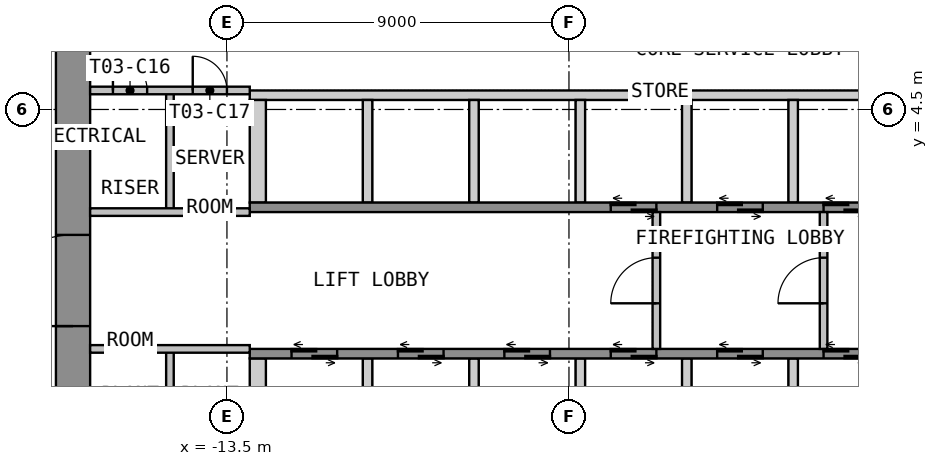
"""IFC4 building model, lengths in metres.
Left out: names, types, materials, properties, quantities, classifications, styles, units other than length and angle.
Written with IfcOpenShell. Run it as: python <this file> out.ifc"""

import sys

from ifc_helpers import new_model, si_unit, direction, frame, frame_2d, origin, place, context, subcontext, project, spatial, polyline, rectangle, outline, extrude, element, fill, save


model = new_model("IFC4")
c1 = context("Model", 3, precision=1e-05, world=origin(), true_north=direction((0.0, 1.0)))
c2 = subcontext(c1, "Body", "Model", "MODEL_VIEW")
j1 = project(units=[si_unit("LENGTHUNIT", "METRE"), si_unit("PLANEANGLEUNIT", "RADIAN")], contexts=[c1])
p1 = place(None, origin())
s1 = spatial("IfcSite", under=j1, at=p1, CompositionType="ELEMENT")
p2 = place(p1, origin())
s2 = spatial("IfcBuilding", under=s1, at=p2, CompositionType="ELEMENT")
p3 = place(p2, frame((0.0, 0.0, 53.4)))
s3 = spatial("IfcBuildingStorey", under=s2, at=p3, CompositionType="ELEMENT", Elevation=53.4)
p4 = place(p3, frame((-17.55, -12.6, 0.0), z_axis=(0.0, 0.0, 1.0), x_axis=(0.0, 1.0, 0.0)))
e1 = element("IfcWall", 1, at=p4, inside=s3, PredefinedType="SHEAR", context=c2, shape_type="SweptSolid", body=[
    extrude(rectangle(XDim=25.2, YDim=0.9, at=frame_2d((12.6, 0.0))), origin(), (0.0, 0.0, 1.0), 3.525),
])
p5 = place(p4, frame((11.4, 0.0, 0.0)))
e2 = element("IfcOpeningElement", 2, at=p5, cuts=e1, PredefinedType="OPENING", context=c2, shape_type="SweptSolid", body=[
    extrude(rectangle(XDim=2.4, YDim=2.1, at=frame_2d((1.2, 1.05))), frame((0.0, 0.46, 0.0), z_axis=(0.0, -1.0, 0.0), x_axis=(1.0, 0.0, 0.0)), (0.0, 0.0, 1.0), 0.92),
])
p6 = place(p3, origin())
e3 = element("IfcWall", 3, at=p6, inside=s3, PredefinedType="SHEAR", context=c2, shape_type="SweptSolid", body=[
    extrude(outline(polyline([(-12.9, 4.75), (12.9, 4.75), (12.9, 5.0), (-12.9, 5.0), (-12.9, 4.75)])), origin(), (0.0, 0.0, 1.0), 3.525),
])
p7 = place(p3, origin())
e4 = element("IfcWall", 4, at=p7, inside=s3, PredefinedType="SHEAR", context=c2, shape_type="SweptSolid", body=[
    extrude(outline(polyline([(-12.9, 2.05), (-12.475, 2.05), (-12.475, 4.75), (-12.9, 4.75), (-12.9, 2.05)])), origin(), (0.0, 0.0, 1.0), 3.525),
])
p8 = place(p3, origin())
e5 = element("IfcWall", 5, at=p8, inside=s3, PredefinedType="SHEAR", context=c2, shape_type="SweptSolid", body=[
    extrude(outline(polyline([(-9.925, 2.05), (-9.675, 2.05), (-9.675, 4.75), (-9.925, 4.75), (-9.925, 2.05)])), origin(), (0.0, 0.0, 1.0), 3.525),
])
p9 = place(p3, origin())
e6 = element("IfcWall", 6, at=p9, inside=s3, PredefinedType="SHEAR", context=c2, shape_type="SweptSolid", body=[
    extrude(outline(polyline([(-7.125, 2.05), (-6.875, 2.05), (-6.875, 4.75), (-7.125, 4.75), (-7.125, 2.05)])), origin(), (0.0, 0.0, 1.0), 3.525),
])
p10 = place(p3, origin())
e7 = element("IfcWall", 7, at=p10, inside=s3, PredefinedType="SHEAR", context=c2, shape_type="SweptSolid", body=[
    extrude(outline(polyline([(-4.325, 2.05), (-4.075, 2.05), (-4.075, 4.75), (-4.325, 4.75), (-4.325, 2.05)])), origin(), (0.0, 0.0, 1.0), 3.525),
])
p11 = place(p3, origin())
e8 = element("IfcWall", 8, at=p11, inside=s3, PredefinedType="SHEAR", context=c2, shape_type="SweptSolid", body=[
    extrude(outline(polyline([(-1.525, 2.05), (-1.275, 2.05), (-1.275, 4.75), (-1.525, 4.75), (-1.525, 2.05)])), origin(), (0.0, 0.0, 1.0), 3.525),
])
p12 = place(p3, origin())
e9 = element("IfcWall", 9, at=p12, inside=s3, PredefinedType="SHEAR", context=c2, shape_type="SweptSolid", body=[
    extrude(outline(polyline([(1.275, 2.05), (1.525, 2.05), (1.525, 4.75), (1.275, 4.75), (1.275, 2.05)])), origin(), (0.0, 0.0, 1.0), 3.525),
])
p13 = place(p3, frame((-12.9, 1.925, 0.0), z_axis=(0.0, 0.0, 1.0), x_axis=(1.0, 0.0, 0.0)))
e10 = element("IfcWall", 10, at=p13, inside=s3, PredefinedType="SHEAR", context=c2, shape_type="SweptSolid", body=[
    extrude(rectangle(XDim=25.8, YDim=0.25, at=frame_2d((12.9, 0.0))), origin(), (0.0, 0.0, 1.0), 3.525),
])
p14 = place(p13, frame((9.5, 0.0, 0.0)))
e11 = element("IfcOpeningElement", 11, at=p14, cuts=e10, PredefinedType="OPENING", context=c2, shape_type="SweptSolid", body=[
    extrude(rectangle(XDim=1.2, YDim=2.1, at=frame_2d((0.6, 1.05))), frame((0.0, 0.135, 0.0), z_axis=(0.0, -1.0, 0.0), x_axis=(1.0, 0.0, 0.0)), (0.0, 0.0, 1.0), 0.27),
])
p15 = place(p13, frame((12.3, 0.0, 0.0)))
e12 = element("IfcOpeningElement", 12, at=p15, cuts=e10, PredefinedType="OPENING", context=c2, shape_type="SweptSolid", body=[
    extrude(rectangle(XDim=1.2, YDim=2.1, at=frame_2d((0.6, 1.05))), frame((0.0, 0.135, 0.0), z_axis=(0.0, -1.0, 0.0), x_axis=(1.0, 0.0, 0.0)), (0.0, 0.0, 1.0), 0.27),
])
p16 = place(p13, frame((15.1, 0.0, 0.0)))
e13 = element("IfcOpeningElement", 13, at=p16, cuts=e10, PredefinedType="OPENING", context=c2, shape_type="SweptSolid", body=[
    extrude(rectangle(XDim=1.2, YDim=2.1, at=frame_2d((0.6, 1.05))), frame((0.0, 0.135, 0.0), z_axis=(0.0, -1.0, 0.0), x_axis=(1.0, 0.0, 0.0)), (0.0, 0.0, 1.0), 0.27),
])
p17 = place(p13, frame((17.9, 0.0, 0.0)))
e14 = element("IfcOpeningElement", 14, at=p17, cuts=e10, PredefinedType="OPENING", context=c2, shape_type="SweptSolid", body=[
    extrude(rectangle(XDim=1.2, YDim=2.1, at=frame_2d((0.6, 1.05))), frame((0.0, 0.135, 0.0), z_axis=(0.0, -1.0, 0.0), x_axis=(1.0, 0.0, 0.0)), (0.0, 0.0, 1.0), 0.27),
])
p18 = place(p13, frame((20.7, 0.0, 0.0)))
e15 = element("IfcOpeningElement", 15, at=p18, cuts=e10, PredefinedType="OPENING", context=c2, shape_type="SweptSolid", body=[
    extrude(rectangle(XDim=1.2, YDim=2.1, at=frame_2d((0.6, 1.05))), frame((0.0, 0.135, 0.0), z_axis=(0.0, -1.0, 0.0), x_axis=(1.0, 0.0, 0.0)), (0.0, 0.0, 1.0), 0.27),
])
p19 = place(p13, frame((23.5, 0.0, 0.0)))
e16 = element("IfcOpeningElement", 16, at=p19, cuts=e10, PredefinedType="OPENING", context=c2, shape_type="SweptSolid", body=[
    extrude(rectangle(XDim=1.2, YDim=2.1, at=frame_2d((0.6, 1.05))), frame((0.0, 0.135, 0.0), z_axis=(0.0, -1.0, 0.0), x_axis=(1.0, 0.0, 0.0)), (0.0, 0.0, 1.0), 0.27),
])
p20 = place(p3, origin())
e17 = element("IfcWall", 17, at=p20, inside=s3, PredefinedType="SHEAR", context=c2, shape_type="SweptSolid", body=[
    extrude(outline(polyline([(-12.9, -4.75), (-12.475, -4.75), (-12.475, -2.05), (-12.9, -2.05), (-12.9, -4.75)])), origin(), (0.0, 0.0, 1.0), 3.525),
])
p21 = place(p3, origin())
e18 = element("IfcWall", 18, at=p21, inside=s3, PredefinedType="SHEAR", context=c2, shape_type="SweptSolid", body=[
    extrude(outline(polyline([(-9.925, -4.75), (-9.675, -4.75), (-9.675, -2.05), (-9.925, -2.05), (-9.925, -4.75)])), origin(), (0.0, 0.0, 1.0), 3.525),
])
p22 = place(p3, origin())
e19 = element("IfcWall", 19, at=p22, inside=s3, PredefinedType="SHEAR", context=c2, shape_type="SweptSolid", body=[
    extrude(outline(polyline([(-7.125, -4.75), (-6.875, -4.75), (-6.875, -2.05), (-7.125, -2.05), (-7.125, -4.75)])), origin(), (0.0, 0.0, 1.0), 3.525),
])
p23 = place(p3, origin())
e20 = element("IfcWall", 20, at=p23, inside=s3, PredefinedType="SHEAR", context=c2, shape_type="SweptSolid", body=[
    extrude(outline(polyline([(-4.325, -4.75), (-4.075, -4.75), (-4.075, -2.05), (-4.325, -2.05), (-4.325, -4.75)])), origin(), (0.0, 0.0, 1.0), 3.525),
])
p24 = place(p3, origin())
e21 = element("IfcWall", 21, at=p24, inside=s3, PredefinedType="SHEAR", context=c2, shape_type="SweptSolid", body=[
    extrude(outline(polyline([(-1.525, -4.75), (-1.275, -4.75), (-1.275, -2.05), (-1.525, -2.05), (-1.525, -4.75)])), origin(), (0.0, 0.0, 1.0), 3.525),
])
p25 = place(p3, origin())
e22 = element("IfcWall", 22, at=p25, inside=s3, PredefinedType="SHEAR", context=c2, shape_type="SweptSolid", body=[
    extrude(outline(polyline([(1.275, -4.75), (1.525, -4.75), (1.525, -2.05), (1.275, -2.05), (1.275, -4.75)])), origin(), (0.0, 0.0, 1.0), 3.525),
])
p26 = place(p3, frame((-12.9, -1.925, 0.0), z_axis=(0.0, 0.0, 1.0), x_axis=(1.0, 0.0, 0.0)))
e23 = element("IfcWall", 23, at=p26, inside=s3, PredefinedType="SHEAR", context=c2, shape_type="SweptSolid", body=[
    extrude(rectangle(XDim=25.8, YDim=0.25, at=frame_2d((12.9, 0.0))), origin(), (0.0, 0.0, 1.0), 3.525),
])
p27 = place(p26, frame((1.1, 0.0, 0.0)))
e24 = element("IfcOpeningElement", 24, at=p27, cuts=e23, PredefinedType="OPENING", context=c2, shape_type="SweptSolid", body=[
    extrude(rectangle(XDim=1.2, YDim=2.1, at=frame_2d((0.6, 1.05))), frame((0.0, 0.135, 0.0), z_axis=(0.0, -1.0, 0.0), x_axis=(1.0, 0.0, 0.0)), (0.0, 0.0, 1.0), 0.27),
])
p28 = place(p26, frame((3.9, 0.0, 0.0)))
e25 = element("IfcOpeningElement", 25, at=p28, cuts=e23, PredefinedType="OPENING", context=c2, shape_type="SweptSolid", body=[
    extrude(rectangle(XDim=1.2, YDim=2.1, at=frame_2d((0.6, 1.05))), frame((0.0, 0.135, 0.0), z_axis=(0.0, -1.0, 0.0), x_axis=(1.0, 0.0, 0.0)), (0.0, 0.0, 1.0), 0.27),
])
p29 = place(p26, frame((6.7, 0.0, 0.0)))
e26 = element("IfcOpeningElement", 26, at=p29, cuts=e23, PredefinedType="OPENING", context=c2, shape_type="SweptSolid", body=[
    extrude(rectangle(XDim=1.2, YDim=2.1, at=frame_2d((0.6, 1.05))), frame((0.0, 0.135, 0.0), z_axis=(0.0, -1.0, 0.0), x_axis=(1.0, 0.0, 0.0)), (0.0, 0.0, 1.0), 0.27),
])
p30 = place(p26, frame((9.5, 0.0, 0.0)))
e27 = element("IfcOpeningElement", 27, at=p30, cuts=e23, PredefinedType="OPENING", context=c2, shape_type="SweptSolid", body=[
    extrude(rectangle(XDim=1.2, YDim=2.1, at=frame_2d((0.6, 1.05))), frame((0.0, 0.135, 0.0), z_axis=(0.0, -1.0, 0.0), x_axis=(1.0, 0.0, 0.0)), (0.0, 0.0, 1.0), 0.27),
])
p31 = place(p26, frame((12.3, 0.0, 0.0)))
e28 = element("IfcOpeningElement", 28, at=p31, cuts=e23, PredefinedType="OPENING", context=c2, shape_type="SweptSolid", body=[
    extrude(rectangle(XDim=1.2, YDim=2.1, at=frame_2d((0.6, 1.05))), frame((0.0, 0.135, 0.0), z_axis=(0.0, -1.0, 0.0), x_axis=(1.0, 0.0, 0.0)), (0.0, 0.0, 1.0), 0.27),
])
p32 = place(p26, frame((15.1, 0.0, 0.0)))
e29 = element("IfcOpeningElement", 29, at=p32, cuts=e23, PredefinedType="OPENING", context=c2, shape_type="SweptSolid", body=[
    extrude(rectangle(XDim=1.2, YDim=2.1, at=frame_2d((0.6, 1.05))), frame((0.0, 0.135, 0.0), z_axis=(0.0, -1.0, 0.0), x_axis=(1.0, 0.0, 0.0)), (0.0, 0.0, 1.0), 0.27),
])
p33 = place(p3, frame((-2.2, -1.8, 0.0), z_axis=(0.0, 0.0, 1.0), x_axis=(0.0, 1.0, 0.0)))
e30 = element("IfcWall", 30, at=p33, inside=s3, PredefinedType="PARTITIONING", context=c2, shape_type="SweptSolid", body=[
    extrude(rectangle(XDim=3.6, YDim=0.2, at=frame_2d((1.8, 0.0))), origin(), (0.0, 0.0, 1.0), 3.525),
])
p34 = place(p33, frame((1.2, 0.0, 0.0)))
e31 = element("IfcOpeningElement", 31, at=p34, cuts=e30, PredefinedType="OPENING", context=c2, shape_type="SweptSolid", body=[
    extrude(rectangle(XDim=1.2, YDim=2.1, at=frame_2d((0.6, 1.05))), frame((0.0, 0.11, 0.0), z_axis=(0.0, -1.0, 0.0), x_axis=(1.0, 0.0, 0.0)), (0.0, 0.0, 1.0), 0.22),
])
p35 = place(p3, frame((2.2, -1.8, 0.0), z_axis=(0.0, 0.0, 1.0), x_axis=(0.0, 1.0, 0.0)))
e32 = element("IfcWall", 32, at=p35, inside=s3, PredefinedType="PARTITIONING", context=c2, shape_type="SweptSolid", body=[
    extrude(rectangle(XDim=3.6, YDim=0.2, at=frame_2d((1.8, 0.0))), origin(), (0.0, 0.0, 1.0), 3.525),
])
p36 = place(p35, frame((1.2, 0.0, 0.0)))
e33 = element("IfcOpeningElement", 33, at=p36, cuts=e32, PredefinedType="OPENING", context=c2, shape_type="SweptSolid", body=[
    extrude(rectangle(XDim=1.2, YDim=2.1, at=frame_2d((0.6, 1.05))), frame((0.0, 0.11, 0.0), z_axis=(0.0, -1.0, 0.0), x_axis=(1.0, 0.0, 0.0)), (0.0, 0.0, 1.0), 0.22),
])
p37 = place(p3, frame((-15.0, 1.8, 0.0), z_axis=(0.0, 0.0, 1.0), x_axis=(0.0, 1.0, 0.0)))
e34 = element("IfcWall", 34, at=p37, inside=s3, PredefinedType="PARTITIONING", context=c2, shape_type="SweptSolid", body=[
    extrude(rectangle(XDim=3.2, YDim=0.2, at=frame_2d((1.6, 0.0))), origin(), (0.0, 0.0, 1.0), 3.525),
])
p38 = place(p3, frame((-17.1, 5.0, 0.0), z_axis=(0.0, 0.0, 1.0), x_axis=(1.0, 0.0, 0.0)))
e35 = element("IfcWall", 35, at=p38, inside=s3, PredefinedType="PARTITIONING", context=c2, shape_type="SweptSolid", body=[
    extrude(rectangle(XDim=4.2, YDim=0.2, at=frame_2d((2.1, 0.0))), origin(), (0.0, 0.0, 1.0), 3.525),
])
p39 = place(p38, frame((0.6, 0.0, 0.0)))
e36 = element("IfcOpeningElement", 36, at=p39, cuts=e35, PredefinedType="OPENING", context=c2, shape_type="SweptSolid", body=[
    extrude(rectangle(XDim=0.9, YDim=2.1, at=frame_2d((0.45, 1.05))), frame((0.0, 0.11, 0.0), z_axis=(0.0, -1.0, 0.0), x_axis=(1.0, 0.0, 0.0)), (0.0, 0.0, 1.0), 0.22),
])
p40 = place(p38, frame((2.7, 0.0, 0.0)))
e37 = element("IfcOpeningElement", 37, at=p40, cuts=e35, PredefinedType="OPENING", context=c2, shape_type="SweptSolid", body=[
    extrude(rectangle(XDim=0.9, YDim=2.1, at=frame_2d((0.45, 1.05))), frame((0.0, 0.11, 0.0), z_axis=(0.0, -1.0, 0.0), x_axis=(1.0, 0.0, 0.0)), (0.0, 0.0, 1.0), 0.22),
])
p41 = place(p3, frame((-17.1, 1.8, 0.0), z_axis=(0.0, 0.0, 1.0), x_axis=(1.0, 0.0, 0.0)))
e38 = element("IfcWall", 38, at=p41, inside=s3, PredefinedType="PARTITIONING", context=c2, shape_type="SweptSolid", body=[
    extrude(rectangle(XDim=4.2, YDim=0.2, at=frame_2d((2.1, 0.0))), origin(), (0.0, 0.0, 1.0), 3.525),
])
p42 = place(p3, frame((-15.0, -5.0, 0.0), z_axis=(0.0, 0.0, 1.0), x_axis=(0.0, 1.0, 0.0)))
e39 = element("IfcWall", 39, at=p42, inside=s3, PredefinedType="PARTITIONING", context=c2, shape_type="SweptSolid", body=[
    extrude(rectangle(XDim=3.2, YDim=0.2, at=frame_2d((1.6, 0.0))), origin(), (0.0, 0.0, 1.0), 3.525),
])
p43 = place(p3, frame((-17.1, -1.8, 0.0), z_axis=(0.0, 0.0, 1.0), x_axis=(1.0, 0.0, 0.0)))
e40 = element("IfcWall", 40, at=p43, inside=s3, PredefinedType="PARTITIONING", context=c2, shape_type="SweptSolid", body=[
    extrude(rectangle(XDim=4.2, YDim=0.2, at=frame_2d((2.1, 0.0))), origin(), (0.0, 0.0, 1.0), 3.525),
])
p44 = place(p5, origin())
e41 = element("IfcDoor", 41, at=p44, inside=s3, OperationType="DOUBLE_DOOR_DOUBLE_SWING", PredefinedType="DOOR", context=c2, shape_type="SweptSolid", body=[
    extrude(rectangle(XDim=2.4, YDim=2.1, at=frame_2d((1.2, 1.05))), frame((0.0, 0.025, 0.0), z_axis=(0.0, -1.0, 0.0), x_axis=(1.0, 0.0, 0.0)), (0.0, 0.0, 1.0), 0.05),
])
fill(e2, e41)
p45 = place(p14, origin())
e42 = element("IfcDoor", 42, at=p45, inside=s3, OperationType="DOUBLE_DOOR_SLIDING", PredefinedType="DOOR", context=c2, shape_type="SweptSolid", body=[
    extrude(rectangle(XDim=1.2, YDim=2.1, at=frame_2d((0.6, 1.05))), frame((0.0, 0.025, 0.0), z_axis=(0.0, -1.0, 0.0), x_axis=(1.0, 0.0, 0.0)), (0.0, 0.0, 1.0), 0.05),
])
fill(e11, e42)
p46 = place(p15, origin())
e43 = element("IfcDoor", 43, at=p46, inside=s3, OperationType="DOUBLE_DOOR_SLIDING", PredefinedType="DOOR", context=c2, shape_type="SweptSolid", body=[
    extrude(rectangle(XDim=1.2, YDim=2.1, at=frame_2d((0.6, 1.05))), frame((0.0, 0.025, 0.0), z_axis=(0.0, -1.0, 0.0), x_axis=(1.0, 0.0, 0.0)), (0.0, 0.0, 1.0), 0.05),
])
fill(e12, e43)
p47 = place(p16, origin())
e44 = element("IfcDoor", 44, at=p47, inside=s3, OperationType="DOUBLE_DOOR_SLIDING", PredefinedType="DOOR", context=c2, shape_type="SweptSolid", body=[
    extrude(rectangle(XDim=1.2, YDim=2.1, at=frame_2d((0.6, 1.05))), frame((0.0, 0.025, 0.0), z_axis=(0.0, -1.0, 0.0), x_axis=(1.0, 0.0, 0.0)), (0.0, 0.0, 1.0), 0.05),
])
fill(e13, e44)
p48 = place(p27, origin())
e45 = element("IfcDoor", 45, at=p48, inside=s3, OperationType="DOUBLE_DOOR_SLIDING", PredefinedType="DOOR", context=c2, shape_type="SweptSolid", body=[
    extrude(rectangle(XDim=1.2, YDim=2.1, at=frame_2d((0.6, 1.05))), frame((0.0, 0.025, 0.0), z_axis=(0.0, -1.0, 0.0), x_axis=(1.0, 0.0, 0.0)), (0.0, 0.0, 1.0), 0.05),
])
fill(e24, e45)
p49 = place(p28, origin())
e46 = element("IfcDoor", 46, at=p49, inside=s3, OperationType="DOUBLE_DOOR_SLIDING", PredefinedType="DOOR", context=c2, shape_type="SweptSolid", body=[
    extrude(rectangle(XDim=1.2, YDim=2.1, at=frame_2d((0.6, 1.05))), frame((0.0, 0.025, 0.0), z_axis=(0.0, -1.0, 0.0), x_axis=(1.0, 0.0, 0.0)), (0.0, 0.0, 1.0), 0.05),
])
fill(e25, e46)
p50 = place(p29, origin())
e47 = element("IfcDoor", 47, at=p50, inside=s3, OperationType="DOUBLE_DOOR_SLIDING", PredefinedType="DOOR", context=c2, shape_type="SweptSolid", body=[
    extrude(rectangle(XDim=1.2, YDim=2.1, at=frame_2d((0.6, 1.05))), frame((0.0, 0.025, 0.0), z_axis=(0.0, -1.0, 0.0), x_axis=(1.0, 0.0, 0.0)), (0.0, 0.0, 1.0), 0.05),
])
fill(e26, e47)
p51 = place(p30, origin())
e48 = element("IfcDoor", 48, at=p51, inside=s3, OperationType="DOUBLE_DOOR_SLIDING", PredefinedType="DOOR", context=c2, shape_type="SweptSolid", body=[
    extrude(rectangle(XDim=1.2, YDim=2.1, at=frame_2d((0.6, 1.05))), frame((0.0, 0.025, 0.0), z_axis=(0.0, -1.0, 0.0), x_axis=(1.0, 0.0, 0.0)), (0.0, 0.0, 1.0), 0.05),
])
fill(e27, e48)
p52 = place(p31, origin())
e49 = element("IfcDoor", 49, at=p52, inside=s3, OperationType="DOUBLE_DOOR_SLIDING", PredefinedType="DOOR", context=c2, shape_type="SweptSolid", body=[
    extrude(rectangle(XDim=1.2, YDim=2.1, at=frame_2d((0.6, 1.05))), frame((0.0, 0.025, 0.0), z_axis=(0.0, -1.0, 0.0), x_axis=(1.0, 0.0, 0.0)), (0.0, 0.0, 1.0), 0.05),
])
fill(e28, e49)
p53 = place(p32, origin())
e50 = element("IfcDoor", 50, at=p53, inside=s3, OperationType="DOUBLE_DOOR_SLIDING", PredefinedType="DOOR", context=c2, shape_type="SweptSolid", body=[
    extrude(rectangle(XDim=1.2, YDim=2.1, at=frame_2d((0.6, 1.05))), frame((0.0, 0.025, 0.0), z_axis=(0.0, -1.0, 0.0), x_axis=(1.0, 0.0, 0.0)), (0.0, 0.0, 1.0), 0.05),
])
fill(e29, e50)
p54 = place(p34, origin())
e51 = element("IfcDoor", 51, at=p54, inside=s3, OperationType="SINGLE_SWING_LEFT", PredefinedType="DOOR", context=c2, shape_type="SweptSolid", body=[
    extrude(rectangle(XDim=1.2, YDim=2.1, at=frame_2d((0.6, 1.05))), frame((0.0, 0.025, 0.0), z_axis=(0.0, -1.0, 0.0), x_axis=(1.0, 0.0, 0.0)), (0.0, 0.0, 1.0), 0.05),
])
fill(e31, e51)
p55 = place(p36, origin())
e52 = element("IfcDoor", 52, at=p55, inside=s3, OperationType="SINGLE_SWING_LEFT", PredefinedType="DOOR", context=c2, shape_type="SweptSolid", body=[
    extrude(rectangle(XDim=1.2, YDim=2.1, at=frame_2d((0.6, 1.05))), frame((0.0, 0.025, 0.0), z_axis=(0.0, -1.0, 0.0), x_axis=(1.0, 0.0, 0.0)), (0.0, 0.0, 1.0), 0.05),
])
fill(e33, e52)
p56 = place(p39, origin())
e53 = element("IfcDoor", 53, at=p56, inside=s3, OperationType="SINGLE_SWING_LEFT", PredefinedType="DOOR", context=c2, shape_type="SweptSolid", body=[
    extrude(rectangle(XDim=0.9, YDim=2.1, at=frame_2d((0.45, 1.05))), frame((0.0, 0.025, 0.0), z_axis=(0.0, -1.0, 0.0), x_axis=(1.0, 0.0, 0.0)), (0.0, 0.0, 1.0), 0.05),
])
fill(e36, e53)
p57 = place(p40, origin())
e54 = element("IfcDoor", 54, at=p57, inside=s3, OperationType="SINGLE_SWING_LEFT", PredefinedType="DOOR", context=c2, shape_type="SweptSolid", body=[
    extrude(rectangle(XDim=0.9, YDim=2.1, at=frame_2d((0.45, 1.05))), frame((0.0, 0.025, 0.0), z_axis=(0.0, -1.0, 0.0), x_axis=(1.0, 0.0, 0.0)), (0.0, 0.0, 1.0), 0.05),
])
fill(e37, e54)
save(model, sys.argv[1])
